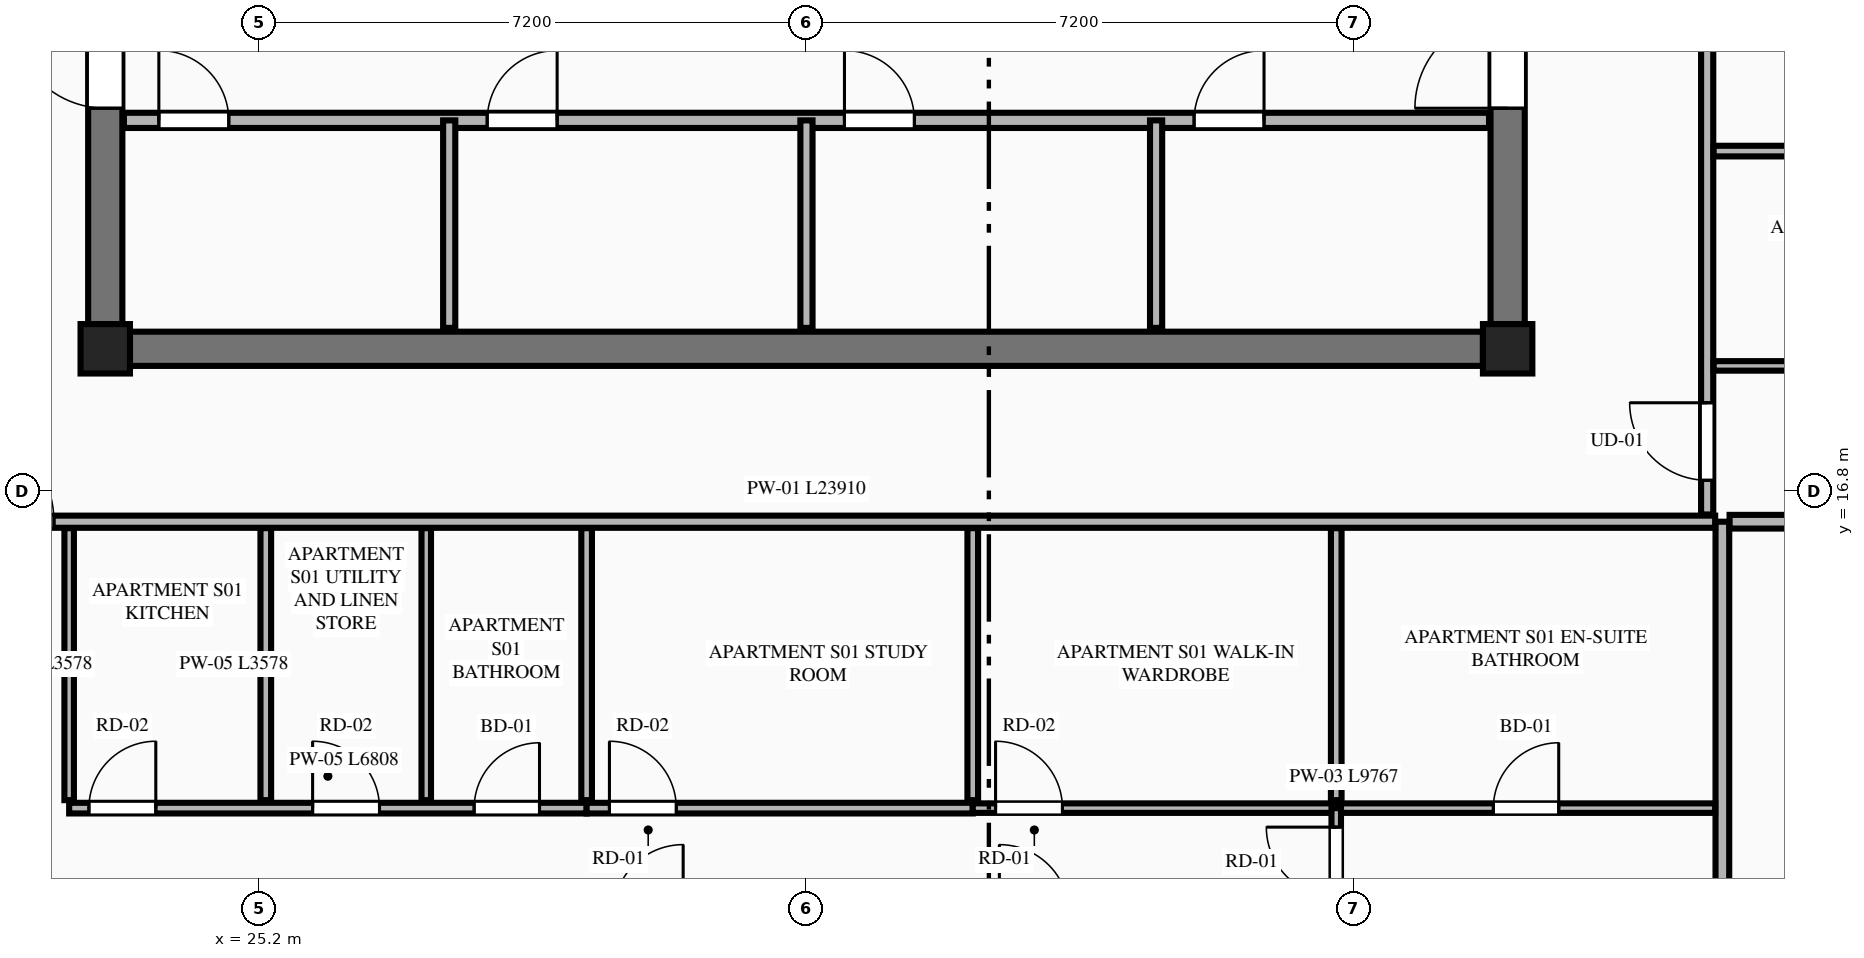
"""IFC4 building model, lengths in metres.
Left out: names, types, materials, properties, quantities, classifications, styles, units other than length and angle.
Written with IfcOpenShell. Run it as: python <this file> out.ifc"""

import sys

from ifc_helpers import new_model, si_unit, direction, frame, frame_2d, origin, origin_2d, place, context, subcontext, project, spatial, rectangle, extrude, element, fill, save


model = new_model("IFC4")
c1 = context("Model", 3, precision=1e-05, world=origin(), true_north=direction((0.0, 1.0)))
c2 = subcontext(c1, "Body", "Model", "MODEL_VIEW")
j1 = project(units=[si_unit("LENGTHUNIT", "METRE"), si_unit("PLANEANGLEUNIT", "RADIAN")], contexts=[c1])
p1 = place(None, origin())
s1 = spatial("IfcSite", under=j1, at=p1, CompositionType="ELEMENT")
p2 = place(p1, origin())
s2 = spatial("IfcBuilding", under=s1, at=p2, CompositionType="ELEMENT")
p3 = place(p2, frame((0.0, 0.0, 291.5)))
s3 = spatial("IfcBuildingStorey", under=s2, at=p3, CompositionType="ELEMENT", Elevation=291.5)
for number, where, z_axis, x_axis in (
    (1, (23.175, 18.675, 0.0), (0.0, 0.0, 1.0), (1.0, 0.0, 0.0)),
    (2, (41.625, 18.675, 0.0), (0.0, 0.0, 1.0), (1.0, 0.0, 0.0)),
):
    element("IfcColumn", number, at=place(p3, frame(where, z_axis=z_axis, x_axis=x_axis)), inside=s3, PredefinedType="COLUMN", context=c2, shape_type="SweptSolid", body=[
        extrude(rectangle(XDim=0.65, YDim=0.65, at=origin_2d()), origin(), (0.0, 0.0, 1.0), 4.0),
    ])
p4 = place(p3, frame((23.5, 18.675, 0.0), z_axis=(0.0, 0.0, 1.0), x_axis=(1.0, 0.0, 0.0)))
e3 = element("IfcWall", 3, at=p4, inside=s3, PredefinedType="SHEAR", context=c2, shape_type="SweptSolid", body=[
    extrude(rectangle(XDim=17.8, YDim=0.45, at=frame_2d((8.9, 0.0))), origin(), (0.0, 0.0, 1.0), 3.8),
])
p5 = place(p3, frame((23.175, 19.0, 0.0), z_axis=(0.0, 0.0, 1.0), x_axis=(0.0, 1.0, 0.0)))
e4 = element("IfcWall", 4, at=p5, inside=s3, PredefinedType="SHEAR", context=c2, shape_type="SweptSolid", body=[
    extrude(rectangle(XDim=13.8, YDim=0.45, at=frame_2d((6.9, 0.0))), origin(), (0.0, 0.0, 1.0), 3.8),
])
p6 = place(p5, frame((2.84, 0.0, 0.0)))
e5 = element("IfcOpeningElement", 5, at=p6, cuts=e4, PredefinedType="OPENING", context=c2, shape_type="SweptSolid", body=[
    extrude(rectangle(XDim=1.22, YDim=2.25, at=frame_2d((0.61, 1.125))), frame((0.0, 0.235, 0.0), z_axis=(0.0, -1.0, 0.0), x_axis=(1.0, 0.0, 0.0)), (0.0, 0.0, 1.0), 0.47),
])
p7 = place(p3, frame((41.625, 19.0, 0.0), z_axis=(0.0, 0.0, 1.0), x_axis=(0.0, 1.0, 0.0)))
e6 = element("IfcWall", 6, at=p7, inside=s3, PredefinedType="SHEAR", context=c2, shape_type="SweptSolid", body=[
    extrude(rectangle(XDim=13.8, YDim=0.45, at=frame_2d((6.9, 0.0))), origin(), (0.0, 0.0, 1.0), 3.8),
])
p8 = place(p7, frame((2.84, 0.0, 0.0)))
e7 = element("IfcOpeningElement", 7, at=p8, cuts=e6, PredefinedType="OPENING", context=c2, shape_type="SweptSolid", body=[
    extrude(rectangle(XDim=1.22, YDim=2.25, at=frame_2d((0.61, 1.125))), frame((0.0, 0.235, 0.0), z_axis=(0.0, -1.0, 0.0), x_axis=(1.0, 0.0, 0.0)), (0.0, 0.0, 1.0), 0.47),
])
p9 = place(p3, frame((23.42, 21.68, 0.0), z_axis=(0.0, 0.0, 1.0), x_axis=(1.0, 0.0, 0.0)))
e8 = element("IfcWall", 8, at=p9, inside=s3, PredefinedType="PLUMBINGWALL", context=c2, shape_type="SweptSolid", body=[
    extrude(rectangle(XDim=17.96, YDim=0.2, at=frame_2d((8.98, 0.0))), origin(), (0.0, 0.0, 1.0), 3.8),
])
p10 = place(p9, frame((0.46, 0.0, 0.0)))
e9 = element("IfcOpeningElement", 9, at=p10, cuts=e8, PredefinedType="OPENING", context=c2, shape_type="SweptSolid", body=[
    extrude(rectangle(XDim=0.92, YDim=2.15, at=frame_2d((0.46, 1.075))), frame((0.0, 0.11, 0.0), z_axis=(0.0, -1.0, 0.0), x_axis=(1.0, 0.0, 0.0)), (0.0, 0.0, 1.0), 0.22),
])
p11 = place(p9, frame((4.78, 0.0, 0.0)))
e10 = element("IfcOpeningElement", 10, at=p11, cuts=e8, PredefinedType="OPENING", context=c2, shape_type="SweptSolid", body=[
    extrude(rectangle(XDim=0.92, YDim=2.15, at=frame_2d((0.46, 1.075))), frame((0.0, 0.11, 0.0), z_axis=(0.0, -1.0, 0.0), x_axis=(1.0, 0.0, 0.0)), (0.0, 0.0, 1.0), 0.22),
])
p12 = place(p9, frame((9.48, 0.0, 0.0)))
e11 = element("IfcOpeningElement", 11, at=p12, cuts=e8, PredefinedType="OPENING", context=c2, shape_type="SweptSolid", body=[
    extrude(rectangle(XDim=0.92, YDim=2.15, at=frame_2d((0.46, 1.075))), frame((0.0, 0.11, 0.0), z_axis=(0.0, -1.0, 0.0), x_axis=(1.0, 0.0, 0.0)), (0.0, 0.0, 1.0), 0.22),
])
p13 = place(p9, frame((14.08, 0.0, 0.0)))
e12 = element("IfcOpeningElement", 12, at=p13, cuts=e8, PredefinedType="OPENING", context=c2, shape_type="SweptSolid", body=[
    extrude(rectangle(XDim=0.92, YDim=2.15, at=frame_2d((0.46, 1.075))), frame((0.0, 0.11, 0.0), z_axis=(0.0, -1.0, 0.0), x_axis=(1.0, 0.0, 0.0)), (0.0, 0.0, 1.0), 0.22),
])
for number, where, z_axis, x_axis in (
    (13, (27.7, 18.95, 0.0), (0.0, 0.0, 1.0), (0.0, 1.0, 0.0)),
    (14, (32.4, 18.95, 0.0), (0.0, 0.0, 1.0), (0.0, 1.0, 0.0)),
    (15, (37.0, 18.95, 0.0), (0.0, 0.0, 1.0), (0.0, 1.0, 0.0)),
):
    element("IfcWall", number, at=place(p3, frame(where, z_axis=z_axis, x_axis=x_axis)), inside=s3, PredefinedType="PARTITIONING", context=c2, shape_type="SweptSolid", body=[
        extrude(rectangle(XDim=2.73, YDim=0.16, at=frame_2d((1.365, 0.0))), origin(), (0.0, 0.0, 1.0), 3.8),
    ])
p14 = place(p3, frame((44.45, 8.119, 0.0), z_axis=(0.0, 0.0, 1.0), x_axis=(0.0, 1.0, 0.0)))
e16 = element("IfcWall", 16, at=p14, inside=s3, PredefinedType="PARTITIONING", context=c2, shape_type="SweptSolid", body=[
    extrude(rectangle(XDim=8.281, YDim=0.18, at=frame_2d((4.141, 0.0))), origin(), (0.0, 0.0, 1.0), 3.8),
])
p15 = place(p3, frame((20.445, 16.4, 0.0), z_axis=(0.0, 0.0, 1.0), x_axis=(1.0, 0.0, 0.0)))
e17 = element("IfcWall", 17, at=p15, inside=s3, PredefinedType="PARTITIONING", context=c2, shape_type="SweptSolid", body=[
    extrude(rectangle(XDim=23.91, YDim=0.16, at=frame_2d((11.955, 0.0))), origin(), (0.0, 0.0, 1.0), 3.8),
])
p16 = place(p15, frame((0.705, 0.0, 0.0)))
e18 = element("IfcOpeningElement", 18, at=p16, cuts=e17, PredefinedType="OPENING", context=c2, shape_type="SweptSolid", body=[
    extrude(rectangle(XDim=1.35, YDim=2.35, at=frame_2d((0.675, 1.175))), frame((0.0, 0.09, 0.0), z_axis=(0.0, -1.0, 0.0), x_axis=(1.0, 0.0, 0.0)), (0.0, 0.0, 1.0), 0.18),
])
p17 = place(p3, frame((22.7, 12.737, 0.0), z_axis=(0.0, 0.0, 1.0), x_axis=(0.0, 1.0, 0.0)))
e19 = element("IfcWall", 19, at=p17, inside=s3, PredefinedType="PARTITIONING", context=c2, shape_type="SweptSolid", body=[
    extrude(rectangle(XDim=3.578, YDim=0.125, at=frame_2d((1.789, 0.0))), origin(), (0.0, 0.0, 1.0), 3.257),
])
p18 = place(p3, frame((22.7, 12.632, 0.0), z_axis=(0.0, 0.0, 1.0), x_axis=(1.0, 0.0, 0.0)))
e20 = element("IfcWall", 20, at=p18, inside=s3, PredefinedType="PLUMBINGWALL", context=c2, shape_type="SweptSolid", body=[
    extrude(rectangle(XDim=6.808, YDim=0.14, at=frame_2d((3.404, 0.0))), origin(), (0.0, 0.0, 1.0), 3.8),
])
p19 = place(p18, frame((5.328, 0.0, 0.0)))
e21 = element("IfcOpeningElement", 21, at=p19, cuts=e20, PredefinedType="OPENING", context=c2, shape_type="SweptSolid", body=[
    extrude(rectangle(XDim=0.86, YDim=2.1, at=frame_2d((0.43, 1.05))), frame((0.0, 0.08, 0.0), z_axis=(0.0, -1.0, 0.0), x_axis=(1.0, 0.0, 0.0)), (0.0, 0.0, 1.0), 0.16),
])
p20 = place(p18, frame((0.26, 0.0, 0.0)))
e22 = element("IfcOpeningElement", 22, at=p20, cuts=e20, PredefinedType="OPENING", context=c2, shape_type="SweptSolid", body=[
    extrude(rectangle(XDim=0.88, YDim=2.15, at=frame_2d((0.44, 1.075))), frame((0.0, 0.08, 0.0), z_axis=(0.0, -1.0, 0.0), x_axis=(1.0, 0.0, 0.0)), (0.0, 0.0, 1.0), 0.16),
])
p21 = place(p18, frame((3.203, 0.0, 0.0)))
e23 = element("IfcOpeningElement", 23, at=p21, cuts=e20, PredefinedType="OPENING", context=c2, shape_type="SweptSolid", body=[
    extrude(rectangle(XDim=0.88, YDim=2.15, at=frame_2d((0.44, 1.075))), frame((0.0, 0.08, 0.0), z_axis=(0.0, -1.0, 0.0), x_axis=(1.0, 0.0, 0.0)), (0.0, 0.0, 1.0), 0.16),
])
p22 = place(p3, frame((29.508, 12.632, 0.0), z_axis=(0.0, 0.0, 1.0), x_axis=(1.0, 0.0, 0.0)))
e24 = element("IfcWall", 24, at=p22, inside=s3, PredefinedType="PLUMBINGWALL", context=c2, shape_type="SweptSolid", body=[
    extrude(rectangle(XDim=5.08, YDim=0.14, at=frame_2d((2.54, 0.0))), origin(), (0.0, 0.0, 1.0), 3.8),
])
p23 = place(p22, frame((0.3, 0.0, 0.0)))
e25 = element("IfcOpeningElement", 25, at=p23, cuts=e24, PredefinedType="OPENING", context=c2, shape_type="SweptSolid", body=[
    extrude(rectangle(XDim=0.88, YDim=2.15, at=frame_2d((0.44, 1.075))), frame((0.0, 0.08, 0.0), z_axis=(0.0, -1.0, 0.0), x_axis=(1.0, 0.0, 0.0)), (0.0, 0.0, 1.0), 0.16),
])
p24 = place(p3, frame((34.588, 12.632, 0.0), z_axis=(0.0, 0.0, 1.0), x_axis=(1.0, 0.0, 0.0)))
e26 = element("IfcWall", 26, at=p24, inside=s3, PredefinedType="PARTITIONING", context=c2, shape_type="SweptSolid", body=[
    extrude(rectangle(XDim=9.767, YDim=0.125, at=frame_2d((4.884, 0.0))), origin(), (0.0, 0.0, 1.0), 3.8),
])
p25 = place(p24, frame((6.849, 0.0, 0.0)))
e27 = element("IfcOpeningElement", 27, at=p25, cuts=e26, PredefinedType="OPENING", context=c2, shape_type="SweptSolid", body=[
    extrude(rectangle(XDim=0.86, YDim=2.1, at=frame_2d((0.43, 1.05))), frame((0.0, 0.073, 0.0), z_axis=(0.0, -1.0, 0.0), x_axis=(1.0, 0.0, 0.0)), (0.0, 0.0, 1.0), 0.145),
])
p26 = place(p24, frame((0.3, 0.0, 0.0)))
e28 = element("IfcOpeningElement", 28, at=p26, cuts=e26, PredefinedType="OPENING", context=c2, shape_type="SweptSolid", body=[
    extrude(rectangle(XDim=0.88, YDim=2.15, at=frame_2d((0.44, 1.075))), frame((0.0, 0.073, 0.0), z_axis=(0.0, -1.0, 0.0), x_axis=(1.0, 0.0, 0.0)), (0.0, 0.0, 1.0), 0.145),
])
p27 = place(p3, frame((25.287, 12.737, 0.0), z_axis=(0.0, 0.0, 1.0), x_axis=(0.0, 1.0, 0.0)))
e29 = element("IfcWall", 29, at=p27, inside=s3, PredefinedType="PLUMBINGWALL", context=c2, shape_type="SweptSolid", body=[
    extrude(rectangle(XDim=3.578, YDim=0.14, at=frame_2d((1.789, 0.0))), origin(), (0.0, 0.0, 1.0), 3.8),
])
p28 = place(p3, frame((27.398, 12.737, 0.0), z_axis=(0.0, 0.0, 1.0), x_axis=(0.0, 1.0, 0.0)))
e30 = element("IfcWall", 30, at=p28, inside=s3, PredefinedType="PARTITIONING", context=c2, shape_type="SweptSolid", body=[
    extrude(rectangle(XDim=3.578, YDim=0.125, at=frame_2d((1.789, 0.0))), origin(), (0.0, 0.0, 1.0), 3.8),
])
p29 = place(p3, frame((39.37, 11.302, 0.0), z_axis=(0.0, 0.0, 1.0), x_axis=(0.0, 1.0, 0.0)))
e31 = element("IfcWall", 31, at=p29, inside=s3, PredefinedType="PARTITIONING", context=c2, shape_type="SweptSolid", body=[
    extrude(rectangle(XDim=1.33, YDim=0.125, at=frame_2d((0.665, 0.0))), origin(), (0.0, 0.0, 1.0), 3.8),
])
p30 = place(p29, frame((0.16, 0.0, 0.0)))
e32 = element("IfcOpeningElement", 32, at=p30, cuts=e31, PredefinedType="OPENING", context=c2, shape_type="SweptSolid", body=[
    extrude(rectangle(XDim=0.92, YDim=2.15, at=frame_2d((0.46, 1.075))), frame((0.0, 0.073, 0.0), z_axis=(0.0, -1.0, 0.0), x_axis=(1.0, 0.0, 0.0)), (0.0, 0.0, 1.0), 0.145),
])
for number, where, z_axis, x_axis in (
    (33, (29.508, 12.737, 0.0), (0.0, 0.0, 1.0), (0.0, 1.0, 0.0)),
    (34, (34.588, 12.737, 0.0), (0.0, 0.0, 1.0), (0.0, 1.0, 0.0)),
    (35, (39.37, 12.737, 0.0), (0.0, 0.0, 1.0), (0.0, 1.0, 0.0)),
):
    element("IfcWall", number, at=place(p3, frame(where, z_axis=z_axis, x_axis=x_axis)), inside=s3, PredefinedType="PLUMBINGWALL", context=c2, shape_type="SweptSolid", body=[
        extrude(rectangle(XDim=3.578, YDim=0.14, at=frame_2d((1.789, 0.0))), origin(), (0.0, 0.0, 1.0), 3.8),
    ])
p31 = place(p3, frame((44.545, 16.4, 0.0), z_axis=(0.0, 0.0, 1.0), x_axis=(1.0, 0.0, 0.0)))
e36 = element("IfcWall", 36, at=p31, inside=s3, PredefinedType="PARTITIONING", context=c2, shape_type="SweptSolid", body=[
    extrude(rectangle(XDim=4.221, YDim=0.18, at=frame_2d((2.111, 0.0))), origin(), (0.0, 0.0, 1.0), 3.8),
])
p32 = place(p3, frame((44.25, 16.495, 0.0), z_axis=(0.0, 0.0, 1.0), x_axis=(0.0, 1.0, 0.0)))
e37 = element("IfcWall", 37, at=p32, inside=s3, PredefinedType="PARTITIONING", context=c2, shape_type="SweptSolid", body=[
    extrude(rectangle(XDim=18.41, YDim=0.16, at=frame_2d((9.205, 0.0))), origin(), (0.0, 0.0, 1.0), 3.487),
])
p33 = place(p32, frame((0.45, 0.0, 0.0)))
e38 = element("IfcOpeningElement", 38, at=p33, cuts=e37, PredefinedType="OPENING", context=c2, shape_type="SweptSolid", body=[
    extrude(rectangle(XDim=1.02, YDim=2.25, at=frame_2d((0.51, 1.125))), frame((0.0, 0.09, 0.0), z_axis=(0.0, -1.0, 0.0), x_axis=(1.0, 0.0, 0.0)), (0.0, 0.0, 1.0), 0.18),
])
p34 = place(p3, frame((44.335, 18.45, 0.0), z_axis=(0.0, 0.0, 1.0), x_axis=(1.0, 0.0, 0.0)))
e39 = element("IfcWall", 39, at=p34, inside=s3, PredefinedType="PARTITIONING", context=c2, shape_type="SweptSolid", body=[
    extrude(rectangle(XDim=3.48, YDim=0.125, at=frame_2d((1.74, 0.0))), origin(), (0.0, 0.0, 1.0), 3.8),
])
p35 = place(p3, frame((44.335, 21.276, 0.0), z_axis=(0.0, 0.0, 1.0), x_axis=(1.0, 0.0, 0.0)))
e40 = element("IfcWall", 40, at=p35, inside=s3, PredefinedType="PLUMBINGWALL", context=c2, shape_type="SweptSolid", body=[
    extrude(rectangle(XDim=3.48, YDim=0.14, at=frame_2d((1.74, 0.0))), origin(), (0.0, 0.0, 1.0), 3.8),
])
p36 = place(p6, origin())
e41 = element("IfcDoor", 41, at=p36, inside=s3, OperationType="SINGLE_SWING_RIGHT", PredefinedType="DOOR", context=c2, shape_type="SweptSolid", body=[
    extrude(rectangle(XDim=1.22, YDim=2.25, at=frame_2d((0.61, 1.125))), frame((0.0, 0.025, 0.0), z_axis=(0.0, -1.0, 0.0), x_axis=(1.0, 0.0, 0.0)), (0.0, 0.0, 1.0), 0.05),
])
fill(e5, e41)
p37 = place(p8, origin())
e42 = element("IfcDoor", 42, at=p37, inside=s3, OperationType="SINGLE_SWING_LEFT", PredefinedType="DOOR", context=c2, shape_type="SweptSolid", body=[
    extrude(rectangle(XDim=1.22, YDim=2.25, at=frame_2d((0.61, 1.125))), frame((0.0, 0.025, 0.0), z_axis=(0.0, -1.0, 0.0), x_axis=(1.0, 0.0, 0.0)), (0.0, 0.0, 1.0), 0.05),
])
fill(e7, e42)
p38 = place(p10, origin())
e43 = element("IfcDoor", 43, at=p38, inside=s3, OperationType="SINGLE_SWING_LEFT", PredefinedType="DOOR", context=c2, shape_type="SweptSolid", body=[
    extrude(rectangle(XDim=0.92, YDim=2.15, at=frame_2d((0.46, 1.075))), frame((0.0, 0.025, 0.0), z_axis=(0.0, -1.0, 0.0), x_axis=(1.0, 0.0, 0.0)), (0.0, 0.0, 1.0), 0.05),
])
fill(e9, e43)
p39 = place(p11, origin())
e44 = element("IfcDoor", 44, at=p39, inside=s3, OperationType="SINGLE_SWING_RIGHT", PredefinedType="DOOR", context=c2, shape_type="SweptSolid", body=[
    extrude(rectangle(XDim=0.92, YDim=2.15, at=frame_2d((0.46, 1.075))), frame((0.0, 0.025, 0.0), z_axis=(0.0, -1.0, 0.0), x_axis=(1.0, 0.0, 0.0)), (0.0, 0.0, 1.0), 0.05),
])
fill(e10, e44)
p40 = place(p12, origin())
e45 = element("IfcDoor", 45, at=p40, inside=s3, OperationType="SINGLE_SWING_LEFT", PredefinedType="DOOR", context=c2, shape_type="SweptSolid", body=[
    extrude(rectangle(XDim=0.92, YDim=2.15, at=frame_2d((0.46, 1.075))), frame((0.0, 0.025, 0.0), z_axis=(0.0, -1.0, 0.0), x_axis=(1.0, 0.0, 0.0)), (0.0, 0.0, 1.0), 0.05),
])
fill(e11, e45)
p41 = place(p13, origin())
e46 = element("IfcDoor", 46, at=p41, inside=s3, OperationType="SINGLE_SWING_RIGHT", PredefinedType="DOOR", context=c2, shape_type="SweptSolid", body=[
    extrude(rectangle(XDim=0.92, YDim=2.15, at=frame_2d((0.46, 1.075))), frame((0.0, 0.025, 0.0), z_axis=(0.0, -1.0, 0.0), x_axis=(1.0, 0.0, 0.0)), (0.0, 0.0, 1.0), 0.05),
])
fill(e12, e46)
p42 = place(p19, origin())
e47 = element("IfcDoor", 47, at=p42, inside=s3, OperationType="SINGLE_SWING_RIGHT", PredefinedType="DOOR", context=c2, shape_type="SweptSolid", body=[
    extrude(rectangle(XDim=0.86, YDim=2.1, at=frame_2d((0.43, 1.05))), frame((0.0, 0.025, 0.0), z_axis=(0.0, -1.0, 0.0), x_axis=(1.0, 0.0, 0.0)), (0.0, 0.0, 1.0), 0.05),
])
fill(e21, e47)
p43 = place(p25, origin())
e48 = element("IfcDoor", 48, at=p43, inside=s3, OperationType="SINGLE_SWING_RIGHT", PredefinedType="DOOR", context=c2, shape_type="SweptSolid", body=[
    extrude(rectangle(XDim=0.86, YDim=2.1, at=frame_2d((0.43, 1.05))), frame((0.0, 0.025, 0.0), z_axis=(0.0, -1.0, 0.0), x_axis=(1.0, 0.0, 0.0)), (0.0, 0.0, 1.0), 0.05),
])
fill(e27, e48)
p44 = place(p16, origin())
e49 = element("IfcDoor", 49, at=p44, inside=s3, OperationType="SINGLE_SWING_LEFT", PredefinedType="DOOR", context=c2, shape_type="SweptSolid", body=[
    extrude(rectangle(XDim=1.35, YDim=2.35, at=frame_2d((0.675, 1.175))), frame((0.0, 0.025, 0.0), z_axis=(0.0, -1.0, 0.0), x_axis=(1.0, 0.0, 0.0)), (0.0, 0.0, 1.0), 0.05),
])
fill(e18, e49)
p45 = place(p20, origin())
e50 = element("IfcDoor", 50, at=p45, inside=s3, OperationType="SINGLE_SWING_RIGHT", PredefinedType="DOOR", context=c2, shape_type="SweptSolid", body=[
    extrude(rectangle(XDim=0.88, YDim=2.15, at=frame_2d((0.44, 1.075))), frame((0.0, 0.025, 0.0), z_axis=(0.0, -1.0, 0.0), x_axis=(1.0, 0.0, 0.0)), (0.0, 0.0, 1.0), 0.05),
])
fill(e22, e50)
p46 = place(p21, origin())
e51 = element("IfcDoor", 51, at=p46, inside=s3, OperationType="SINGLE_SWING_LEFT", PredefinedType="DOOR", context=c2, shape_type="SweptSolid", body=[
    extrude(rectangle(XDim=0.88, YDim=2.15, at=frame_2d((0.44, 1.075))), frame((0.0, 0.025, 0.0), z_axis=(0.0, -1.0, 0.0), x_axis=(1.0, 0.0, 0.0)), (0.0, 0.0, 1.0), 0.05),
])
fill(e23, e51)
p47 = place(p23, origin())
e52 = element("IfcDoor", 52, at=p47, inside=s3, OperationType="SINGLE_SWING_LEFT", PredefinedType="DOOR", context=c2, shape_type="SweptSolid", body=[
    extrude(rectangle(XDim=0.88, YDim=2.15, at=frame_2d((0.44, 1.075))), frame((0.0, 0.025, 0.0), z_axis=(0.0, -1.0, 0.0), x_axis=(1.0, 0.0, 0.0)), (0.0, 0.0, 1.0), 0.05),
])
fill(e25, e52)
p48 = place(p30, origin())
e53 = element("IfcDoor", 53, at=p48, inside=s3, OperationType="SINGLE_SWING_RIGHT", PredefinedType="DOOR", context=c2, shape_type="SweptSolid", body=[
    extrude(rectangle(XDim=0.92, YDim=2.15, at=frame_2d((0.46, 1.075))), frame((0.0, 0.025, 0.0), z_axis=(0.0, -1.0, 0.0), x_axis=(1.0, 0.0, 0.0)), (0.0, 0.0, 1.0), 0.05),
])
fill(e32, e53)
p49 = place(p26, origin())
e54 = element("IfcDoor", 54, at=p49, inside=s3, OperationType="SINGLE_SWING_LEFT", PredefinedType="DOOR", context=c2, shape_type="SweptSolid", body=[
    extrude(rectangle(XDim=0.88, YDim=2.15, at=frame_2d((0.44, 1.075))), frame((0.0, 0.025, 0.0), z_axis=(0.0, -1.0, 0.0), x_axis=(1.0, 0.0, 0.0)), (0.0, 0.0, 1.0), 0.05),
])
fill(e28, e54)
p50 = place(p33, origin())
e55 = element("IfcDoor", 55, at=p50, inside=s3, OperationType="SINGLE_SWING_RIGHT", PredefinedType="DOOR", context=c2, shape_type="SweptSolid", body=[
    extrude(rectangle(XDim=1.02, YDim=2.25, at=frame_2d((0.51, 1.125))), frame((0.0, 0.025, 0.0), z_axis=(0.0, -1.0, 0.0), x_axis=(1.0, 0.0, 0.0)), (0.0, 0.0, 1.0), 0.05),
])
fill(e38, e55)
save(model, sys.argv[1])
